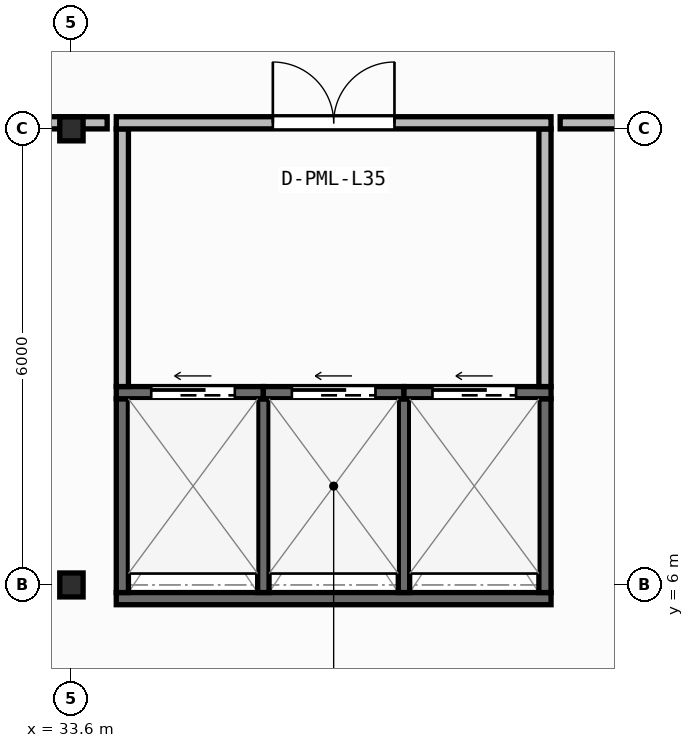
"""IFC4 building model, lengths in metres.
Left out: names, types, materials, properties, quantities, classifications, styles, units other than length and angle.
Written with IfcOpenShell. Run it as: python <this file> out.ifc"""

import sys

from ifc_helpers import new_model, si_unit, direction, frame, frame_2d, origin, origin_2d, place, context, subcontext, project, spatial, rectangle, i_section, extrude, element, fill, save


model = new_model("IFC4")
c1 = context("Model", 3, precision=1e-05, world=origin(), true_north=direction((0.0, 1.0)))
c2 = subcontext(c1, "Body", "Model", "MODEL_VIEW")
j1 = project(units=[si_unit("LENGTHUNIT", "METRE"), si_unit("PLANEANGLEUNIT", "RADIAN")], contexts=[c1])
p1 = place(None, origin())
s1 = spatial("IfcSite", under=j1, at=p1, CompositionType="ELEMENT")
p2 = place(p1, origin())
s2 = spatial("IfcBuilding", under=s1, at=p2, CompositionType="ELEMENT")
p3 = place(p2, frame((0.0, 0.0, 142.85)))
s3 = spatial("IfcBuildingStorey", under=s2, at=p3, CompositionType="ELEMENT", Elevation=142.85)
for number, where, z_axis, x_axis in (
    (1, (33.6, 6.0, 0.0), (0.0, 0.0, 1.0), (1.0, 0.0, 0.0)),
    (2, (33.6, 12.0, 0.0), (0.0, 0.0, 1.0), (1.0, 0.0, 0.0)),
):
    element("IfcColumn", number, at=place(p3, frame(where, z_axis=z_axis, x_axis=x_axis)), inside=s3, PredefinedType="COLUMN", context=c2, shape_type="SweptSolid", body=[
        extrude(i_section(OverallWidth=0.307, OverallDepth=0.315, WebThickness=0.012, FlangeThickness=0.019, FilletRadius=0.017, at=origin_2d()), origin(), (0.0, 0.0, 1.0), 3.95),
    ])
p4 = place(p3, frame((34.19, 5.82, 0.0), z_axis=(0.0, 0.0, 1.0), x_axis=(1.0, 0.0, 0.0)))
e3 = element("IfcWall", 3, at=p4, inside=s3, PredefinedType="SHEAR", context=c2, shape_type="SweptSolid", body=[
    extrude(rectangle(XDim=5.72, YDim=0.16, at=frame_2d((2.86, 0.0))), origin(), (0.0, 0.0, 1.0), 3.71),
])
for number, where, z_axis, x_axis in (
    (4, (34.27, 5.9, 0.0), (0.0, 0.0, 1.0), (0.0, 1.0, 0.0)),
    (5, (39.83, 5.9, 0.0), (0.0, 0.0, 1.0), (0.0, 1.0, 0.0)),
):
    element("IfcWall", number, at=place(p3, frame(where, z_axis=z_axis, x_axis=x_axis)), inside=s3, PredefinedType="SHEAR", context=c2, shape_type="SweptSolid", body=[
        extrude(rectangle(XDim=2.55, YDim=0.16, at=frame_2d((1.275, 0.0))), origin(), (0.0, 0.0, 1.0), 3.71),
    ])
for number, where, z_axis, x_axis in (
    (6, (36.125, 5.9, 0.0), (0.0, 0.0, 1.0), (0.0, 1.0, 0.0)),
    (7, (37.975, 5.9, 0.0), (0.0, 0.0, 1.0), (0.0, 1.0, 0.0)),
):
    element("IfcWall", number, at=place(p3, frame(where, z_axis=z_axis, x_axis=x_axis)), inside=s3, PredefinedType="SHEAR", context=c2, shape_type="SweptSolid", body=[
        extrude(rectangle(XDim=2.55, YDim=0.15, at=frame_2d((1.275, 0.0))), origin(), (0.0, 0.0, 1.0), 3.71),
    ])
p5 = place(p3, frame((34.19, 8.53, 0.0), z_axis=(0.0, 0.0, 1.0), x_axis=(1.0, 0.0, 0.0)))
e8 = element("IfcWall", 8, at=p5, inside=s3, PredefinedType="SHEAR", context=c2, shape_type="SweptSolid", body=[
    extrude(rectangle(XDim=1.935, YDim=0.16, at=frame_2d((0.968, 0.0))), origin(), (0.0, 0.0, 1.0), 3.71),
])
p6 = place(p5, frame((0.46, 0.0, 0.0)))
e9 = element("IfcOpeningElement", 9, at=p6, cuts=e8, PredefinedType="OPENING", context=c2, shape_type="SweptSolid", body=[
    extrude(rectangle(XDim=1.1, YDim=2.15, at=frame_2d((0.55, 1.075))), frame((0.0, 0.09, 0.0), z_axis=(0.0, -1.0, 0.0), x_axis=(1.0, 0.0, 0.0)), (0.0, 0.0, 1.0), 0.18),
])
p7 = place(p3, frame((36.125, 8.53, 0.0), z_axis=(0.0, 0.0, 1.0), x_axis=(1.0, 0.0, 0.0)))
e10 = element("IfcWall", 10, at=p7, inside=s3, PredefinedType="SHEAR", context=c2, shape_type="SweptSolid", body=[
    extrude(rectangle(XDim=1.85, YDim=0.16, at=frame_2d((0.925, 0.0))), origin(), (0.0, 0.0, 1.0), 3.71),
])
p8 = place(p7, frame((0.375, 0.0, 0.0)))
e11 = element("IfcOpeningElement", 11, at=p8, cuts=e10, PredefinedType="OPENING", context=c2, shape_type="SweptSolid", body=[
    extrude(rectangle(XDim=1.1, YDim=2.15, at=frame_2d((0.55, 1.075))), frame((0.0, 0.09, 0.0), z_axis=(0.0, -1.0, 0.0), x_axis=(1.0, 0.0, 0.0)), (0.0, 0.0, 1.0), 0.18),
])
p9 = place(p3, frame((37.975, 8.53, 0.0), z_axis=(0.0, 0.0, 1.0), x_axis=(1.0, 0.0, 0.0)))
e12 = element("IfcWall", 12, at=p9, inside=s3, PredefinedType="SHEAR", context=c2, shape_type="SweptSolid", body=[
    extrude(rectangle(XDim=1.935, YDim=0.16, at=frame_2d((0.967, 0.0))), origin(), (0.0, 0.0, 1.0), 3.71),
])
p10 = place(p9, frame((0.375, 0.0, 0.0)))
e13 = element("IfcOpeningElement", 13, at=p10, cuts=e12, PredefinedType="OPENING", context=c2, shape_type="SweptSolid", body=[
    extrude(rectangle(XDim=1.1, YDim=2.15, at=frame_2d((0.55, 1.075))), frame((0.0, 0.09, 0.0), z_axis=(0.0, -1.0, 0.0), x_axis=(1.0, 0.0, 0.0)), (0.0, 0.0, 1.0), 0.18),
])
for number, where, z_axis, x_axis in (
    (14, (34.27, 8.61, 0.0), (0.0, 0.0, 1.0), (0.0, 1.0, 0.0)),
    (15, (39.83, 8.61, 0.0), (0.0, 0.0, 1.0), (0.0, 1.0, 0.0)),
):
    element("IfcWall", number, at=place(p3, frame(where, z_axis=z_axis, x_axis=x_axis)), inside=s3, PredefinedType="PARTITIONING", context=c2, shape_type="SweptSolid", body=[
        extrude(rectangle(XDim=3.39, YDim=0.16, at=frame_2d((1.695, 0.0))), origin(), (0.0, 0.0, 1.0), 3.71),
    ])
p11 = place(p3, frame((34.19, 12.08, 0.0), z_axis=(0.0, 0.0, 1.0), x_axis=(1.0, 0.0, 0.0)))
e16 = element("IfcWall", 16, at=p11, inside=s3, PredefinedType="PARTITIONING", context=c2, shape_type="SweptSolid", body=[
    extrude(rectangle(XDim=5.72, YDim=0.16, at=frame_2d((2.86, 0.0))), origin(), (0.0, 0.0, 1.0), 3.083),
])
p12 = place(p11, frame((2.06, 0.0, 0.0)))
e17 = element("IfcOpeningElement", 17, at=p12, cuts=e16, PredefinedType="OPENING", context=c2, shape_type="SweptSolid", body=[
    extrude(rectangle(XDim=1.6, YDim=2.05, at=frame_2d((0.8, 1.025))), frame((0.0, 0.09, 0.0), z_axis=(0.0, -1.0, 0.0), x_axis=(1.0, 0.0, 0.0)), (0.0, 0.0, 1.0), 0.18),
])
p13 = place(p3, frame((31.439, 12.08, 0.0), z_axis=(0.0, 0.0, 1.0), x_axis=(1.0, 0.0, 0.0)))
e18 = element("IfcWall", 18, at=p13, inside=s3, PredefinedType="PARTITIONING", context=c2, shape_type="SweptSolid", body=[
    extrude(rectangle(XDim=2.631, YDim=0.16, at=frame_2d((1.315, 0.0))), origin(), (0.0, 0.0, 1.0), 3.083),
])
p14 = place(p3, frame((40.03, 12.08, 0.0), z_axis=(0.0, 0.0, 1.0), x_axis=(1.0, 0.0, 0.0)))
e19 = element("IfcWall", 19, at=p14, inside=s3, PredefinedType="PARTITIONING", context=c2, shape_type="SweptSolid", body=[
    extrude(rectangle(XDim=2.781, YDim=0.16, at=frame_2d((1.39, 0.0))), origin(), (0.0, 0.0, 1.0), 3.083),
])
p15 = place(p6, origin())
e20 = element("IfcDoor", 20, at=p15, inside=s3, OperationType="SLIDING_TO_LEFT", PredefinedType="DOOR", context=c2, shape_type="SweptSolid", body=[
    extrude(rectangle(XDim=1.1, YDim=2.15, at=frame_2d((0.55, 1.075))), frame((0.0, 0.025, 0.0), z_axis=(0.0, -1.0, 0.0), x_axis=(1.0, 0.0, 0.0)), (0.0, 0.0, 1.0), 0.05),
])
fill(e9, e20)
p16 = place(p8, origin())
e21 = element("IfcDoor", 21, at=p16, inside=s3, OperationType="SLIDING_TO_LEFT", PredefinedType="DOOR", context=c2, shape_type="SweptSolid", body=[
    extrude(rectangle(XDim=1.1, YDim=2.15, at=frame_2d((0.55, 1.075))), frame((0.0, 0.025, 0.0), z_axis=(0.0, -1.0, 0.0), x_axis=(1.0, 0.0, 0.0)), (0.0, 0.0, 1.0), 0.05),
])
fill(e11, e21)
p17 = place(p10, origin())
e22 = element("IfcDoor", 22, at=p17, inside=s3, OperationType="SLIDING_TO_LEFT", PredefinedType="DOOR", context=c2, shape_type="SweptSolid", body=[
    extrude(rectangle(XDim=1.1, YDim=2.15, at=frame_2d((0.55, 1.075))), frame((0.0, 0.025, 0.0), z_axis=(0.0, -1.0, 0.0), x_axis=(1.0, 0.0, 0.0)), (0.0, 0.0, 1.0), 0.05),
])
fill(e13, e22)
p18 = place(p12, origin())
e23 = element("IfcDoor", 23, at=p18, inside=s3, OperationType="DOUBLE_DOOR_SINGLE_SWING", PredefinedType="DOOR", context=c2, shape_type="SweptSolid", body=[
    extrude(rectangle(XDim=1.6, YDim=2.05, at=frame_2d((0.8, 1.025))), frame((0.0, 0.025, 0.0), z_axis=(0.0, -1.0, 0.0), x_axis=(1.0, 0.0, 0.0)), (0.0, 0.0, 1.0), 0.05),
])
fill(e17, e23)
save(model, sys.argv[1])
